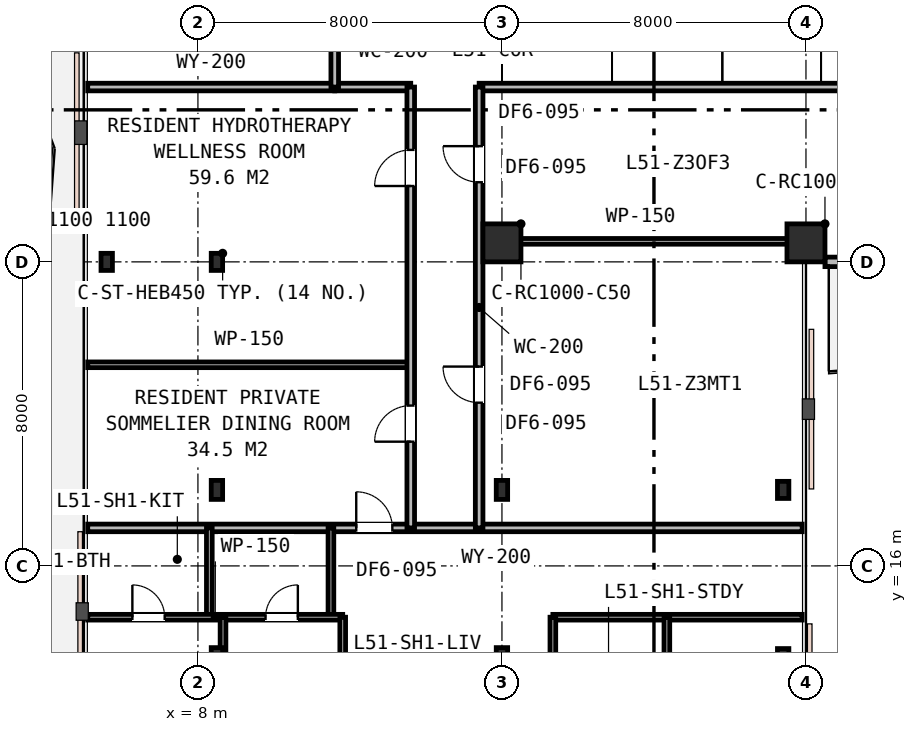
"""IFC4 building model, lengths in metres.
Left out: names, types, materials, properties, quantities, classifications, styles, units other than length and angle.
Written with IfcOpenShell. Run it as: python <this file> out.ifc"""

import sys

from ifc_helpers import new_model, si_unit, direction, frame, frame_2d, origin, origin_2d, place, context, subcontext, project, spatial, rectangle, i_section, extrude, element, fill, save


model = new_model("IFC4")
c1 = context("Model", 3, precision=1e-05, world=origin(), true_north=direction((0.0, 1.0)))
c2 = subcontext(c1, "Body", "Model", "MODEL_VIEW")
j1 = project(units=[si_unit("LENGTHUNIT", "METRE"), si_unit("PLANEANGLEUNIT", "RADIAN")], contexts=[c1])
p1 = place(None, origin())
s1 = spatial("IfcSite", under=j1, at=p1, CompositionType="ELEMENT")
p2 = place(p1, origin())
s2 = spatial("IfcBuilding", under=s1, at=p2, CompositionType="ELEMENT")
p3 = place(p2, frame((0.0, 0.0, 197.4)))
s3 = spatial("IfcBuildingStorey", under=s2, at=p3, CompositionType="ELEMENT", Elevation=197.4)
p4 = place(p3, frame((8.5, 24.0, 0.0), z_axis=(0.0, 0.0, 1.0), x_axis=(1.0, 0.0, 0.0)))
e1 = element("IfcColumn", 1, at=p4, inside=s3, PredefinedType="COLUMN", context=c2, shape_type="SweptSolid", body=[
    extrude(i_section(OverallWidth=0.3, OverallDepth=0.45, WebThickness=0.014, FlangeThickness=0.026, FilletRadius=0.027, at=origin_2d()), origin(), (0.0, 0.0, 1.0), 3.6),
])
for number, where, z_axis, x_axis in (
    (2, (16.0, 24.5, 0.0), (0.0, 0.0, 1.0), (1.0, 0.0, 0.0)),
    (3, (24.0, 24.5, 0.0), (0.0, 0.0, 1.0), (1.0, 0.0, 0.0)),
):
    element("IfcColumn", number, at=place(p3, frame(where, z_axis=z_axis, x_axis=x_axis)), inside=s3, PredefinedType="COLUMN", context=c2, shape_type="SweptSolid", body=[
        extrude(rectangle(XDim=1.0, YDim=1.0, at=origin_2d()), origin(), (0.0, 0.0, 1.0), 3.6),
    ])
for number, where, z_axis, x_axis in (
    (4, (5.6, 24.0, 0.0), (0.0, 0.0, 1.0), (1.0, 0.0, 0.0)),
    (5, (23.4, 13.6, 0.0), (0.0, 0.0, 1.0), (1.0, 0.0, 0.0)),
    (6, (23.4, 18.0, 0.0), (0.0, 0.0, 1.0), (1.0, 0.0, 0.0)),
):
    element("IfcColumn", number, at=place(p3, frame(where, z_axis=z_axis, x_axis=x_axis)), inside=s3, PredefinedType="COLUMN", context=c2, shape_type="SweptSolid", body=[
        extrude(i_section(OverallWidth=0.3, OverallDepth=0.45, WebThickness=0.014, FlangeThickness=0.026, FilletRadius=0.027, at=origin_2d()), origin(), (0.0, 0.0, 1.0), 3.6),
    ])
for number, where, z_axis, x_axis in (
    (7, (8.5, 13.6, 0.0), (0.0, 0.0, 1.0), (1.0, 0.0, 0.0)),
    (8, (16.0, 13.6, 0.0), (0.0, 0.0, 1.0), (1.0, 0.0, 0.0)),
    (9, (8.5, 18.0, 0.0), (0.0, 0.0, 1.0), (1.0, 0.0, 0.0)),
    (10, (16.0, 18.0, 0.0), (0.0, 0.0, 1.0), (1.0, 0.0, 0.0)),
):
    element("IfcColumn", number, at=place(p3, frame(where, z_axis=z_axis, x_axis=x_axis)), inside=s3, PredefinedType="COLUMN", context=c2, shape_type="SweptSolid", body=[
        extrude(i_section(OverallWidth=0.3, OverallDepth=0.5, WebThickness=0.015, FlangeThickness=0.028, FilletRadius=0.027, at=origin_2d()), origin(), (0.0, 0.0, 1.0), 3.6),
    ])
p5 = place(p3, frame((24.5, 24.0, 0.0), z_axis=(0.0, 0.0, 1.0), x_axis=(1.0, 0.0, 0.0)))
e11 = element("IfcWall", 11, at=p5, inside=s3, PredefinedType="STANDARD", context=c2, shape_type="SweptSolid", body=[
    extrude(rectangle(XDim=1.35, YDim=0.25, at=frame_2d((0.675, 0.0))), origin(), (0.0, 0.0, 1.0), 3.02),
])
p6 = place(p3, frame((5.1, 28.6, 0.0), z_axis=(0.0, 0.0, 1.0), x_axis=(1.0, 0.0, 0.0)))
e12 = element("IfcWall", 12, at=p6, inside=s3, PredefinedType="PARTITIONING", context=c2, shape_type="SweptSolid", body=[
    extrude(rectangle(XDim=6.5, YDim=0.2, at=frame_2d((3.25, 0.0))), origin(), (0.0, 0.0, 1.0), 2.92),
])
p7 = place(p3, frame((11.6, 28.6, 0.0), z_axis=(0.0, 0.0, 1.0), x_axis=(1.0, 0.0, 0.0)))
e13 = element("IfcWall", 13, at=p7, inside=s3, PredefinedType="PARTITIONING", context=c2, shape_type="SweptSolid", body=[
    extrude(rectangle(XDim=2.0, YDim=0.2, at=frame_2d((1.0, 0.0))), origin(), (0.0, 0.0, 1.0), 3.33),
])
p8 = place(p3, frame((15.4, 28.6, 0.0), z_axis=(0.0, 0.0, 1.0), x_axis=(1.0, 0.0, 0.0)))
e14 = element("IfcWall", 14, at=p8, inside=s3, PredefinedType="PARTITIONING", context=c2, shape_type="SweptSolid", body=[
    extrude(rectangle(XDim=35.5, YDim=0.2, at=frame_2d((17.75, 0.0))), origin(), (0.0, 0.0, 1.0), 2.92),
])
p9 = place(p8, frame((11.525, 0.0, 0.0)))
e15 = element("IfcOpeningElement", 15, at=p9, cuts=e14, PredefinedType="OPENING", context=c2, shape_type="SweptSolid", body=[
    extrude(rectangle(XDim=0.95, YDim=2.15, at=frame_2d((0.475, 1.075))), frame((0.0, 0.11, 0.0), z_axis=(0.0, -1.0, 0.0), x_axis=(1.0, 0.0, 0.0)), (0.0, 0.0, 1.0), 0.22),
])
p10 = place(p8, frame((19.425, 0.0, 0.0)))
e16 = element("IfcOpeningElement", 16, at=p10, cuts=e14, PredefinedType="OPENING", context=c2, shape_type="SweptSolid", body=[
    extrude(rectangle(XDim=0.95, YDim=2.15, at=frame_2d((0.475, 1.075))), frame((0.0, 0.11, 0.0), z_axis=(0.0, -1.0, 0.0), x_axis=(1.0, 0.0, 0.0)), (0.0, 0.0, 1.0), 0.22),
])
p11 = place(p8, frame((26.275, 0.0, 0.0)))
e17 = element("IfcOpeningElement", 17, at=p11, cuts=e14, PredefinedType="OPENING", context=c2, shape_type="SweptSolid", body=[
    extrude(rectangle(XDim=0.95, YDim=2.15, at=frame_2d((0.475, 1.075))), frame((0.0, 0.11, 0.0), z_axis=(0.0, -1.0, 0.0), x_axis=(1.0, 0.0, 0.0)), (0.0, 0.0, 1.0), 0.22),
])
p12 = place(p3, frame((11.6, 28.6, 0.0), z_axis=(0.0, 0.0, 1.0), x_axis=(0.0, 1.0, 0.0)))
e18 = element("IfcWall", 18, at=p12, inside=s3, PredefinedType="PARTITIONING", context=c2, shape_type="SweptSolid", body=[
    extrude(rectangle(XDim=7.4, YDim=0.2, at=frame_2d((3.7, 0.0))), origin(), (0.0, 0.0, 1.0), 2.92),
])
p13 = place(p12, frame((4.325, 0.0, 0.0)))
e19 = element("IfcOpeningElement", 19, at=p13, cuts=e18, PredefinedType="OPENING", context=c2, shape_type="SweptSolid", body=[
    extrude(rectangle(XDim=0.95, YDim=2.15, at=frame_2d((0.475, 1.075))), frame((0.0, 0.11, 0.0), z_axis=(0.0, -1.0, 0.0), x_axis=(1.0, 0.0, 0.0)), (0.0, 0.0, 1.0), 0.22),
])
p14 = place(p3, frame((5.1, 17.0, 0.0), z_axis=(0.0, 0.0, 1.0), x_axis=(1.0, 0.0, 0.0)))
e20 = element("IfcWall", 20, at=p14, inside=s3, PredefinedType="PARTITIONING", context=c2, shape_type="SweptSolid", body=[
    extrude(rectangle(XDim=18.8, YDim=0.2, at=frame_2d((9.4, 0.0))), origin(), (0.0, 0.0, 1.0), 2.92),
])
p15 = place(p14, frame((7.066, 0.0, 0.0)))
e21 = element("IfcOpeningElement", 21, at=p15, cuts=e20, PredefinedType="OPENING", context=c2, shape_type="SweptSolid", body=[
    extrude(rectangle(XDim=0.95, YDim=2.15, at=frame_2d((0.475, 1.075))), frame((0.0, 0.11, 0.0), z_axis=(0.0, -1.0, 0.0), x_axis=(1.0, 0.0, 0.0)), (0.0, 0.0, 1.0), 0.22),
])
p16 = place(p3, frame((5.1, 21.292, 0.0), z_axis=(0.0, 0.0, 1.0), x_axis=(1.0, 0.0, 0.0)))
e22 = element("IfcWall", 22, at=p16, inside=s3, PredefinedType="PARTITIONING", context=c2, shape_type="SweptSolid", body=[
    extrude(rectangle(XDim=8.5, YDim=0.15, at=frame_2d((4.25, 0.0))), origin(), (0.0, 0.0, 1.0), 2.92),
])
p17 = place(p3, frame((13.6, 17.0, 0.0), z_axis=(0.0, 0.0, 1.0), x_axis=(0.0, 1.0, 0.0)))
e23 = element("IfcWall", 23, at=p17, inside=s3, PredefinedType="PARTITIONING", context=c2, shape_type="SweptSolid", body=[
    extrude(rectangle(XDim=11.6, YDim=0.2, at=frame_2d((5.8, 0.0))), origin(), (0.0, 0.0, 1.0), 2.92),
])
p18 = place(p17, frame((8.996, 0.0, 0.0)))
e24 = element("IfcOpeningElement", 24, at=p18, cuts=e23, PredefinedType="OPENING", context=c2, shape_type="SweptSolid", body=[
    extrude(rectangle(XDim=0.95, YDim=2.15, at=frame_2d((0.475, 1.075))), frame((0.0, 0.11, 0.0), z_axis=(0.0, -1.0, 0.0), x_axis=(1.0, 0.0, 0.0)), (0.0, 0.0, 1.0), 0.22),
])
p19 = place(p17, frame((2.269, 0.0, 0.0)))
e25 = element("IfcOpeningElement", 25, at=p19, cuts=e23, PredefinedType="OPENING", context=c2, shape_type="SweptSolid", body=[
    extrude(rectangle(XDim=0.95, YDim=2.15, at=frame_2d((0.475, 1.075))), frame((0.0, 0.11, 0.0), z_axis=(0.0, -1.0, 0.0), x_axis=(1.0, 0.0, 0.0)), (0.0, 0.0, 1.0), 0.22),
])
p20 = place(p3, frame((15.4, 24.54, 0.0), z_axis=(0.0, 0.0, 1.0), x_axis=(1.0, 0.0, 0.0)))
e26 = element("IfcWall", 26, at=p20, inside=s3, PredefinedType="PARTITIONING", context=c2, shape_type="SweptSolid", body=[
    extrude(rectangle(XDim=8.5, YDim=0.15, at=frame_2d((4.25, 0.0))), origin(), (0.0, 0.0, 1.0), 2.92),
])
p21 = place(p3, frame((15.4, 17.0, 0.0), z_axis=(0.0, 0.0, 1.0), x_axis=(0.0, 1.0, 0.0)))
e27 = element("IfcWall", 27, at=p21, inside=s3, PredefinedType="PARTITIONING", context=c2, shape_type="SweptSolid", body=[
    extrude(rectangle(XDim=11.6, YDim=0.2, at=frame_2d((5.8, 0.0))), origin(), (0.0, 0.0, 1.0), 2.92),
])
p22 = place(p21, frame((9.095, 0.0, 0.0)))
e28 = element("IfcOpeningElement", 28, at=p22, cuts=e27, PredefinedType="OPENING", context=c2, shape_type="SweptSolid", body=[
    extrude(rectangle(XDim=0.95, YDim=2.15, at=frame_2d((0.475, 1.075))), frame((0.0, 0.11, 0.0), z_axis=(0.0, -1.0, 0.0), x_axis=(1.0, 0.0, 0.0)), (0.0, 0.0, 1.0), 0.22),
])
p23 = place(p21, frame((3.295, 0.0, 0.0)))
e29 = element("IfcOpeningElement", 29, at=p23, cuts=e27, PredefinedType="OPENING", context=c2, shape_type="SweptSolid", body=[
    extrude(rectangle(XDim=0.95, YDim=2.15, at=frame_2d((0.475, 1.075))), frame((0.0, 0.11, 0.0), z_axis=(0.0, -1.0, 0.0), x_axis=(1.0, 0.0, 0.0)), (0.0, 0.0, 1.0), 0.22),
])
p24 = place(p3, frame((11.5, 14.65, 0.0), z_axis=(0.0, 0.0, 1.0), x_axis=(0.0, 1.0, 0.0)))
e30 = element("IfcWall", 30, at=p24, inside=s3, PredefinedType="PARTITIONING", context=c2, shape_type="SweptSolid", body=[
    extrude(rectangle(XDim=2.35, YDim=0.15, at=frame_2d((1.175, 0.0))), origin(), (0.0, 0.0, 1.0), 3.07),
])
p25 = place(p3, frame((8.3, 14.65, 0.0), z_axis=(0.0, 0.0, 1.0), x_axis=(0.0, 1.0, 0.0)))
e31 = element("IfcWall", 31, at=p25, inside=s3, PredefinedType="PARTITIONING", context=c2, shape_type="SweptSolid", body=[
    extrude(rectangle(XDim=2.35, YDim=0.15, at=frame_2d((1.175, 0.0))), origin(), (0.0, 0.0, 1.0), 2.92),
])
p26 = place(p3, frame((5.1, 14.65, 0.0), z_axis=(0.0, 0.0, 1.0), x_axis=(1.0, 0.0, 0.0)))
e32 = element("IfcWall", 32, at=p26, inside=s3, PredefinedType="PARTITIONING", context=c2, shape_type="SweptSolid", body=[
    extrude(rectangle(XDim=6.71, YDim=0.15, at=frame_2d((3.355, 0.0))), origin(), (0.0, 0.0, 1.0), 2.92),
])
p27 = place(p26, frame((1.175, 0.0, 0.0)))
e33 = element("IfcOpeningElement", 33, at=p27, cuts=e32, PredefinedType="OPENING", context=c2, shape_type="SweptSolid", body=[
    extrude(rectangle(XDim=0.85, YDim=2.15, at=frame_2d((0.425, 1.075))), frame((0.0, 0.085, 0.0), z_axis=(0.0, -1.0, 0.0), x_axis=(1.0, 0.0, 0.0)), (0.0, 0.0, 1.0), 0.17),
])
p28 = place(p26, frame((4.679, 0.0, 0.0)))
e34 = element("IfcOpeningElement", 34, at=p28, cuts=e32, PredefinedType="OPENING", context=c2, shape_type="SweptSolid", body=[
    extrude(rectangle(XDim=0.85, YDim=2.15, at=frame_2d((0.425, 1.075))), frame((0.0, 0.085, 0.0), z_axis=(0.0, -1.0, 0.0), x_axis=(1.0, 0.0, 0.0)), (0.0, 0.0, 1.0), 0.17),
])
p29 = place(p3, frame((17.34, 14.65, 0.0), z_axis=(0.0, 0.0, 1.0), x_axis=(1.0, 0.0, 0.0)))
e35 = element("IfcWall", 35, at=p29, inside=s3, PredefinedType="PARTITIONING", context=c2, shape_type="SweptSolid", body=[
    extrude(rectangle(XDim=6.56, YDim=0.15, at=frame_2d((3.28, 0.0))), origin(), (0.0, 0.0, 1.0), 3.02),
])
p30 = place(p3, frame((8.66, 5.1, 0.0), z_axis=(0.0, 0.0, 1.0), x_axis=(0.0, 1.0, 0.0)))
e36 = element("IfcWall", 36, at=p30, inside=s3, PredefinedType="PARTITIONING", context=c2, shape_type="SweptSolid", body=[
    extrude(rectangle(XDim=9.55, YDim=0.15, at=frame_2d((4.775, 0.0))), origin(), (0.0, 0.0, 1.0), 2.92),
])
p31 = place(p30, frame((4.779, 0.0, 0.0)))
e37 = element("IfcOpeningElement", 37, at=p31, cuts=e36, PredefinedType="OPENING", context=c2, shape_type="SweptSolid", body=[
    extrude(rectangle(XDim=0.9, YDim=2.15, at=frame_2d((0.45, 1.075))), frame((0.0, 0.085, 0.0), z_axis=(0.0, -1.0, 0.0), x_axis=(1.0, 0.0, 0.0)), (0.0, 0.0, 1.0), 0.17),
])
p32 = place(p3, frame((20.34, 5.1, 0.0), z_axis=(0.0, 0.0, 1.0), x_axis=(0.0, 1.0, 0.0)))
e38 = element("IfcWall", 38, at=p32, inside=s3, PredefinedType="PARTITIONING", context=c2, shape_type="SweptSolid", body=[
    extrude(rectangle(XDim=9.55, YDim=0.15, at=frame_2d((4.775, 0.0))), origin(), (0.0, 0.0, 1.0), 2.92),
])
p33 = place(p32, frame((4.325, 0.0, 0.0)))
e39 = element("IfcOpeningElement", 39, at=p33, cuts=e38, PredefinedType="OPENING", context=c2, shape_type="SweptSolid", body=[
    extrude(rectangle(XDim=0.9, YDim=2.15, at=frame_2d((0.45, 1.075))), frame((0.0, 0.085, 0.0), z_axis=(0.0, -1.0, 0.0), x_axis=(1.0, 0.0, 0.0)), (0.0, 0.0, 1.0), 0.17),
])
p34 = place(p3, frame((17.34, 5.1, 0.0), z_axis=(0.0, 0.0, 1.0), x_axis=(0.0, 1.0, 0.0)))
e40 = element("IfcWall", 40, at=p34, inside=s3, PredefinedType="PARTITIONING", context=c2, shape_type="SweptSolid", body=[
    extrude(rectangle(XDim=9.55, YDim=0.15, at=frame_2d((4.775, 0.0))), origin(), (0.0, 0.0, 1.0), 2.92),
])
p35 = place(p34, frame((4.779, 0.0, 0.0)))
e41 = element("IfcOpeningElement", 41, at=p35, cuts=e40, PredefinedType="OPENING", context=c2, shape_type="SweptSolid", body=[
    extrude(rectangle(XDim=0.9, YDim=2.15, at=frame_2d((0.45, 1.075))), frame((0.0, 0.085, 0.0), z_axis=(0.0, -1.0, 0.0), x_axis=(1.0, 0.0, 0.0)), (0.0, 0.0, 1.0), 0.17),
])
p36 = place(p3, frame((11.81, 5.1, 0.0), z_axis=(0.0, 0.0, 1.0), x_axis=(0.0, 1.0, 0.0)))
e42 = element("IfcWall", 42, at=p36, inside=s3, PredefinedType="PARTITIONING", context=c2, shape_type="SweptSolid", body=[
    extrude(rectangle(XDim=9.55, YDim=0.15, at=frame_2d((4.775, 0.0))), origin(), (0.0, 0.0, 1.0), 2.92),
])
p37 = place(p36, frame((4.325, 0.0, 0.0)))
e43 = element("IfcOpeningElement", 43, at=p37, cuts=e42, PredefinedType="OPENING", context=c2, shape_type="SweptSolid", body=[
    extrude(rectangle(XDim=0.9, YDim=2.15, at=frame_2d((0.45, 1.075))), frame((0.0, 0.085, 0.0), z_axis=(0.0, -1.0, 0.0), x_axis=(1.0, 0.0, 0.0)), (0.0, 0.0, 1.0), 0.17),
])
p38 = place(p18, origin())
e44 = element("IfcDoor", 44, at=p38, inside=s3, OperationType="SINGLE_SWING_LEFT", PredefinedType="DOOR", context=c2, shape_type="SweptSolid", body=[
    extrude(rectangle(XDim=0.95, YDim=2.15, at=frame_2d((0.475, 1.075))), frame((0.0, 0.025, 0.0), z_axis=(0.0, -1.0, 0.0), x_axis=(1.0, 0.0, 0.0)), (0.0, 0.0, 1.0), 0.05),
])
fill(e24, e44)
p39 = place(p19, origin())
e45 = element("IfcDoor", 45, at=p39, inside=s3, OperationType="SINGLE_SWING_LEFT", PredefinedType="DOOR", context=c2, shape_type="SweptSolid", body=[
    extrude(rectangle(XDim=0.95, YDim=2.15, at=frame_2d((0.475, 1.075))), frame((0.0, 0.025, 0.0), z_axis=(0.0, -1.0, 0.0), x_axis=(1.0, 0.0, 0.0)), (0.0, 0.0, 1.0), 0.05),
])
fill(e25, e45)
p40 = place(p22, origin())
e46 = element("IfcDoor", 46, at=p40, inside=s3, OperationType="SINGLE_SWING_RIGHT", PredefinedType="DOOR", context=c2, shape_type="SweptSolid", body=[
    extrude(rectangle(XDim=0.95, YDim=2.15, at=frame_2d((0.475, 1.075))), frame((0.0, 0.025, 0.0), z_axis=(0.0, -1.0, 0.0), x_axis=(1.0, 0.0, 0.0)), (0.0, 0.0, 1.0), 0.05),
])
fill(e28, e46)
p41 = place(p23, origin())
e47 = element("IfcDoor", 47, at=p41, inside=s3, OperationType="SINGLE_SWING_RIGHT", PredefinedType="DOOR", context=c2, shape_type="SweptSolid", body=[
    extrude(rectangle(XDim=0.95, YDim=2.15, at=frame_2d((0.475, 1.075))), frame((0.0, 0.025, 0.0), z_axis=(0.0, -1.0, 0.0), x_axis=(1.0, 0.0, 0.0)), (0.0, 0.0, 1.0), 0.05),
])
fill(e29, e47)
p42 = place(p15, origin())
e48 = element("IfcDoor", 48, at=p42, inside=s3, OperationType="SINGLE_SWING_LEFT", PredefinedType="DOOR", context=c2, shape_type="SweptSolid", body=[
    extrude(rectangle(XDim=0.95, YDim=2.15, at=frame_2d((0.475, 1.075))), frame((0.0, 0.025, 0.0), z_axis=(0.0, -1.0, 0.0), x_axis=(1.0, 0.0, 0.0)), (0.0, 0.0, 1.0), 0.05),
])
fill(e21, e48)
p43 = place(p27, origin())
e49 = element("IfcDoor", 49, at=p43, inside=s3, OperationType="SINGLE_SWING_LEFT", PredefinedType="DOOR", context=c2, shape_type="SweptSolid", body=[
    extrude(rectangle(XDim=0.85, YDim=2.15, at=frame_2d((0.425, 1.075))), frame((0.0, 0.025, 0.0), z_axis=(0.0, -1.0, 0.0), x_axis=(1.0, 0.0, 0.0)), (0.0, 0.0, 1.0), 0.05),
])
fill(e33, e49)
p44 = place(p28, origin())
e50 = element("IfcDoor", 50, at=p44, inside=s3, OperationType="SINGLE_SWING_RIGHT", PredefinedType="DOOR", context=c2, shape_type="SweptSolid", body=[
    extrude(rectangle(XDim=0.85, YDim=2.15, at=frame_2d((0.425, 1.075))), frame((0.0, 0.025, 0.0), z_axis=(0.0, -1.0, 0.0), x_axis=(1.0, 0.0, 0.0)), (0.0, 0.0, 1.0), 0.05),
])
fill(e34, e50)
save(model, sys.argv[1])
